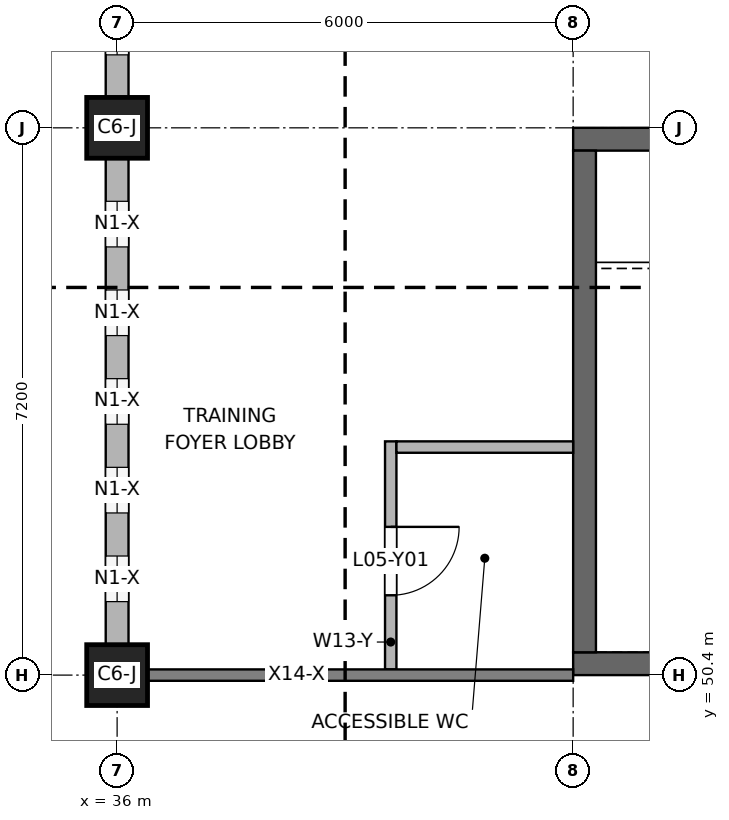
"""IFC4 building model, lengths in metres.
Left out: names, types, materials, properties, quantities, classifications, styles, units other than length and angle.
Written with IfcOpenShell. Run it as: python <this file> out.ifc"""

import sys

from ifc_helpers import new_model, si_unit, direction, frame, frame_2d, origin, origin_2d, place, context, subcontext, project, spatial, rectangle, extrude, element, fill, save


model = new_model("IFC4")
c1 = context("Model", 3, precision=1e-05, world=origin(), true_north=direction((0.0, 1.0)))
c2 = subcontext(c1, "Body", "Model", "MODEL_VIEW")
j1 = project(units=[si_unit("LENGTHUNIT", "METRE"), si_unit("PLANEANGLEUNIT", "RADIAN")], contexts=[c1])
p1 = place(None, origin())
s1 = spatial("IfcSite", under=j1, at=p1, CompositionType="ELEMENT")
p2 = place(p1, origin())
s2 = spatial("IfcBuilding", under=s1, at=p2, CompositionType="ELEMENT")
p3 = place(p2, frame((0.0, 0.0, 21.0)))
s3 = spatial("IfcBuildingStorey", under=s2, at=p3, CompositionType="ELEMENT", Elevation=21.0)
p4 = place(p3, frame((42.0, 50.55, 0.0), z_axis=(0.0, 0.0, 1.0), x_axis=(1.0, 0.0, 0.0)))
e1 = element("IfcWall", 1, at=p4, inside=s3, PredefinedType="SHEAR", context=c2, shape_type="SweptSolid", body=[
    extrude(rectangle(XDim=6.0, YDim=0.3, at=frame_2d((3.0, 0.0))), origin(), (0.0, 0.0, 1.0), 3.95),
])
p5 = place(p3, frame((42.0, 57.45, 0.0), z_axis=(0.0, 0.0, 1.0), x_axis=(1.0, 0.0, 0.0)))
e2 = element("IfcWall", 2, at=p5, inside=s3, PredefinedType="SHEAR", context=c2, shape_type="SweptSolid", body=[
    extrude(rectangle(XDim=6.0, YDim=0.3, at=frame_2d((3.0, 0.0))), origin(), (0.0, 0.0, 1.0), 3.95),
])
p6 = place(p5, frame((2.4, 0.0, 0.0)))
e3 = element("IfcOpeningElement", 3, at=p6, cuts=e2, PredefinedType="OPENING", context=c2, shape_type="SweptSolid", body=[
    extrude(rectangle(XDim=1.2, YDim=2.1, at=frame_2d((0.6, 1.05))), frame((0.0, 0.16, 0.0), z_axis=(0.0, -1.0, 0.0), x_axis=(1.0, 0.0, 0.0)), (0.0, 0.0, 1.0), 0.32),
])
p7 = place(p3, frame((42.15, 50.7, 0.0), z_axis=(0.0, 0.0, 1.0), x_axis=(0.0, 1.0, 0.0)))
e4 = element("IfcWall", 4, at=p7, inside=s3, PredefinedType="SHEAR", context=c2, shape_type="SweptSolid", body=[
    extrude(rectangle(XDim=6.6, YDim=0.3, at=frame_2d((3.3, 0.0))), origin(), (0.0, 0.0, 1.0), 3.95),
])
for number, where, z_axis, x_axis in (
    (5, (36.0, 50.4, 0.0), (0.0, 0.0, 1.0), (1.0, 0.0, 0.0)),
    (6, (36.0, 57.6, 0.0), (0.0, 0.0, 1.0), (1.0, 0.0, 0.0)),
):
    element("IfcColumn", number, at=place(p3, frame(where, z_axis=z_axis, x_axis=x_axis)), inside=s3, PredefinedType="COLUMN", context=c2, shape_type="SweptSolid", body=[
        extrude(rectangle(XDim=0.8, YDim=0.8, at=origin_2d()), origin(), (0.0, 0.0, 1.0), 3.95),
    ])
p8 = place(p3, frame((36.0, 50.8, 0.0), z_axis=(0.0, 0.0, 1.0), x_axis=(0.0, 1.0, 0.0)))
e7 = element("IfcWall", 7, at=p8, inside=s3, PredefinedType="SOLIDWALL", context=c2, shape_type="SweptSolid", body=[
    extrude(rectangle(XDim=6.4, YDim=0.3, at=frame_2d((3.2, 0.0))), origin(), (0.0, 0.0, 1.0), 3.15),
])
p9 = place(p8, frame((0.567, 0.0, 0.9)))
e8 = element("IfcOpeningElement", 8, at=p9, cuts=e7, PredefinedType="OPENING", context=c2, shape_type="SweptSolid", body=[
    extrude(rectangle(XDim=0.6, YDim=1.9, at=frame_2d((0.3, 0.95))), frame((0.0, 0.16, 0.0), z_axis=(0.0, -1.0, 0.0), x_axis=(1.0, 0.0, 0.0)), (0.0, 0.0, 1.0), 0.32),
])
p10 = place(p8, frame((1.733, 0.0, 0.9)))
e9 = element("IfcOpeningElement", 9, at=p10, cuts=e7, PredefinedType="OPENING", context=c2, shape_type="SweptSolid", body=[
    extrude(rectangle(XDim=0.6, YDim=1.9, at=frame_2d((0.3, 0.95))), frame((0.0, 0.16, 0.0), z_axis=(0.0, -1.0, 0.0), x_axis=(1.0, 0.0, 0.0)), (0.0, 0.0, 1.0), 0.32),
])
p11 = place(p8, frame((2.9, 0.0, 0.9)))
e10 = element("IfcOpeningElement", 10, at=p11, cuts=e7, PredefinedType="OPENING", context=c2, shape_type="SweptSolid", body=[
    extrude(rectangle(XDim=0.6, YDim=1.9, at=frame_2d((0.3, 0.95))), frame((0.0, 0.16, 0.0), z_axis=(0.0, -1.0, 0.0), x_axis=(1.0, 0.0, 0.0)), (0.0, 0.0, 1.0), 0.32),
])
p12 = place(p8, frame((4.067, 0.0, 0.9)))
e11 = element("IfcOpeningElement", 11, at=p12, cuts=e7, PredefinedType="OPENING", context=c2, shape_type="SweptSolid", body=[
    extrude(rectangle(XDim=0.6, YDim=1.9, at=frame_2d((0.3, 0.95))), frame((0.0, 0.16, 0.0), z_axis=(0.0, -1.0, 0.0), x_axis=(1.0, 0.0, 0.0)), (0.0, 0.0, 1.0), 0.32),
])
p13 = place(p8, frame((5.233, 0.0, 0.9)))
e12 = element("IfcOpeningElement", 12, at=p13, cuts=e7, PredefinedType="OPENING", context=c2, shape_type="SweptSolid", body=[
    extrude(rectangle(XDim=0.6, YDim=1.9, at=frame_2d((0.3, 0.95))), frame((0.0, 0.16, 0.0), z_axis=(0.0, -1.0, 0.0), x_axis=(1.0, 0.0, 0.0)), (0.0, 0.0, 1.0), 0.32),
])
p14 = place(p3, frame((36.0, 58.0, 0.0), z_axis=(0.0, 0.0, 1.0), x_axis=(0.0, 1.0, 0.0)))
e13 = element("IfcWall", 13, at=p14, inside=s3, PredefinedType="SOLIDWALL", context=c2, shape_type="SweptSolid", body=[
    extrude(rectangle(XDim=6.4, YDim=0.3, at=frame_2d((3.2, 0.0))), origin(), (0.0, 0.0, 1.0), 3.15),
])
p15 = place(p14, frame((0.56, 0.0, 0.9)))
e14 = element("IfcOpeningElement", 14, at=p15, cuts=e13, PredefinedType="OPENING", context=c2, shape_type="SweptSolid", body=[
    extrude(rectangle(XDim=0.6, YDim=1.9, at=frame_2d((0.3, 0.95))), frame((0.0, 0.16, 0.0), z_axis=(0.0, -1.0, 0.0), x_axis=(1.0, 0.0, 0.0)), (0.0, 0.0, 1.0), 0.32),
])
p16 = place(p14, frame((2.86, 0.0, 0.9)))
e15 = element("IfcOpeningElement", 15, at=p16, cuts=e13, PredefinedType="OPENING", context=c2, shape_type="SweptSolid", body=[
    extrude(rectangle(XDim=0.6, YDim=1.9, at=frame_2d((0.3, 0.95))), frame((0.0, 0.16, 0.0), z_axis=(0.0, -1.0, 0.0), x_axis=(1.0, 0.0, 0.0)), (0.0, 0.0, 1.0), 0.32),
])
p17 = place(p14, frame((4.04, 0.0, 0.9)))
e16 = element("IfcOpeningElement", 16, at=p17, cuts=e13, PredefinedType="OPENING", context=c2, shape_type="SweptSolid", body=[
    extrude(rectangle(XDim=0.6, YDim=1.9, at=frame_2d((0.3, 0.95))), frame((0.0, 0.16, 0.0), z_axis=(0.0, -1.0, 0.0), x_axis=(1.0, 0.0, 0.0)), (0.0, 0.0, 1.0), 0.32),
])
p18 = place(p14, frame((5.22, 0.0, 0.9)))
e17 = element("IfcOpeningElement", 17, at=p18, cuts=e13, PredefinedType="OPENING", context=c2, shape_type="SweptSolid", body=[
    extrude(rectangle(XDim=0.6, YDim=1.9, at=frame_2d((0.3, 0.95))), frame((0.0, 0.16, 0.0), z_axis=(0.0, -1.0, 0.0), x_axis=(1.0, 0.0, 0.0)), (0.0, 0.0, 1.0), 0.32),
])
p19 = place(p3, frame((39.6, 50.475, 0.0), z_axis=(0.0, 0.0, 1.0), x_axis=(0.0, 1.0, 0.0)))
e18 = element("IfcWall", 18, at=p19, inside=s3, PredefinedType="PARTITIONING", context=c2, shape_type="SweptSolid", body=[
    extrude(rectangle(XDim=3.0, YDim=0.15, at=frame_2d((1.5, 0.0))), origin(), (0.0, 0.0, 1.0), 3.95),
])
p20 = place(p19, frame((0.975, 0.0, 0.0)))
e19 = element("IfcOpeningElement", 19, at=p20, cuts=e18, PredefinedType="OPENING", context=c2, shape_type="SweptSolid", body=[
    extrude(rectangle(XDim=0.9, YDim=2.1, at=frame_2d((0.45, 1.05))), frame((0.0, 0.085, 0.0), z_axis=(0.0, -1.0, 0.0), x_axis=(1.0, 0.0, 0.0)), (0.0, 0.0, 1.0), 0.17),
])
p21 = place(p3, frame((39.675, 53.4, 0.0), z_axis=(0.0, 0.0, 1.0), x_axis=(1.0, 0.0, 0.0)))
e20 = element("IfcWall", 20, at=p21, inside=s3, PredefinedType="PARTITIONING", context=c2, shape_type="SweptSolid", body=[
    extrude(rectangle(XDim=2.325, YDim=0.15, at=frame_2d((1.163, 0.0))), origin(), (0.0, 0.0, 1.0), 3.95),
])
p22 = place(p9, origin())
e21 = element("IfcWindow", 21, at=p22, inside=s3, PartitioningType="SINGLE_PANEL", PredefinedType="WINDOW", context=c2, shape_type="SweptSolid", body=[
    extrude(rectangle(XDim=0.6, YDim=1.9, at=frame_2d((0.3, 0.95))), frame((0.0, 0.03, 0.0), z_axis=(0.0, -1.0, 0.0), x_axis=(1.0, 0.0, 0.0)), (0.0, 0.0, 1.0), 0.06),
])
fill(e8, e21)
p23 = place(p10, origin())
e22 = element("IfcWindow", 22, at=p23, inside=s3, PartitioningType="SINGLE_PANEL", PredefinedType="WINDOW", context=c2, shape_type="SweptSolid", body=[
    extrude(rectangle(XDim=0.6, YDim=1.9, at=frame_2d((0.3, 0.95))), frame((0.0, 0.03, 0.0), z_axis=(0.0, -1.0, 0.0), x_axis=(1.0, 0.0, 0.0)), (0.0, 0.0, 1.0), 0.06),
])
fill(e9, e22)
p24 = place(p11, origin())
e23 = element("IfcWindow", 23, at=p24, inside=s3, PartitioningType="SINGLE_PANEL", PredefinedType="WINDOW", context=c2, shape_type="SweptSolid", body=[
    extrude(rectangle(XDim=0.6, YDim=1.9, at=frame_2d((0.3, 0.95))), frame((0.0, 0.03, 0.0), z_axis=(0.0, -1.0, 0.0), x_axis=(1.0, 0.0, 0.0)), (0.0, 0.0, 1.0), 0.06),
])
fill(e10, e23)
p25 = place(p12, origin())
e24 = element("IfcWindow", 24, at=p25, inside=s3, PartitioningType="SINGLE_PANEL", PredefinedType="WINDOW", context=c2, shape_type="SweptSolid", body=[
    extrude(rectangle(XDim=0.6, YDim=1.9, at=frame_2d((0.3, 0.95))), frame((0.0, 0.03, 0.0), z_axis=(0.0, -1.0, 0.0), x_axis=(1.0, 0.0, 0.0)), (0.0, 0.0, 1.0), 0.06),
])
fill(e11, e24)
p26 = place(p13, origin())
e25 = element("IfcWindow", 25, at=p26, inside=s3, PartitioningType="SINGLE_PANEL", PredefinedType="WINDOW", context=c2, shape_type="SweptSolid", body=[
    extrude(rectangle(XDim=0.6, YDim=1.9, at=frame_2d((0.3, 0.95))), frame((0.0, 0.03, 0.0), z_axis=(0.0, -1.0, 0.0), x_axis=(1.0, 0.0, 0.0)), (0.0, 0.0, 1.0), 0.06),
])
fill(e12, e25)
p27 = place(p15, origin())
e26 = element("IfcWindow", 26, at=p27, inside=s3, PartitioningType="SINGLE_PANEL", PredefinedType="WINDOW", context=c2, shape_type="SweptSolid", body=[
    extrude(rectangle(XDim=0.6, YDim=1.9, at=frame_2d((0.3, 0.95))), frame((0.0, 0.03, 0.0), z_axis=(0.0, -1.0, 0.0), x_axis=(1.0, 0.0, 0.0)), (0.0, 0.0, 1.0), 0.06),
])
fill(e14, e26)
p28 = place(p20, frame((0.9, 0.0, 0.0), z_axis=(0.0, 0.0, 1.0), x_axis=(-1.0, 0.0, 0.0)))
e27 = element("IfcDoor", 27, at=p28, inside=s3, OperationType="SINGLE_SWING_LEFT", PredefinedType="DOOR", context=c2, shape_type="SweptSolid", body=[
    extrude(rectangle(XDim=0.9, YDim=2.1, at=frame_2d((0.45, 1.05))), frame((0.0, 0.025, 0.0), z_axis=(0.0, -1.0, 0.0), x_axis=(1.0, 0.0, 0.0)), (0.0, 0.0, 1.0), 0.05),
])
fill(e19, e27)
save(model, sys.argv[1])
